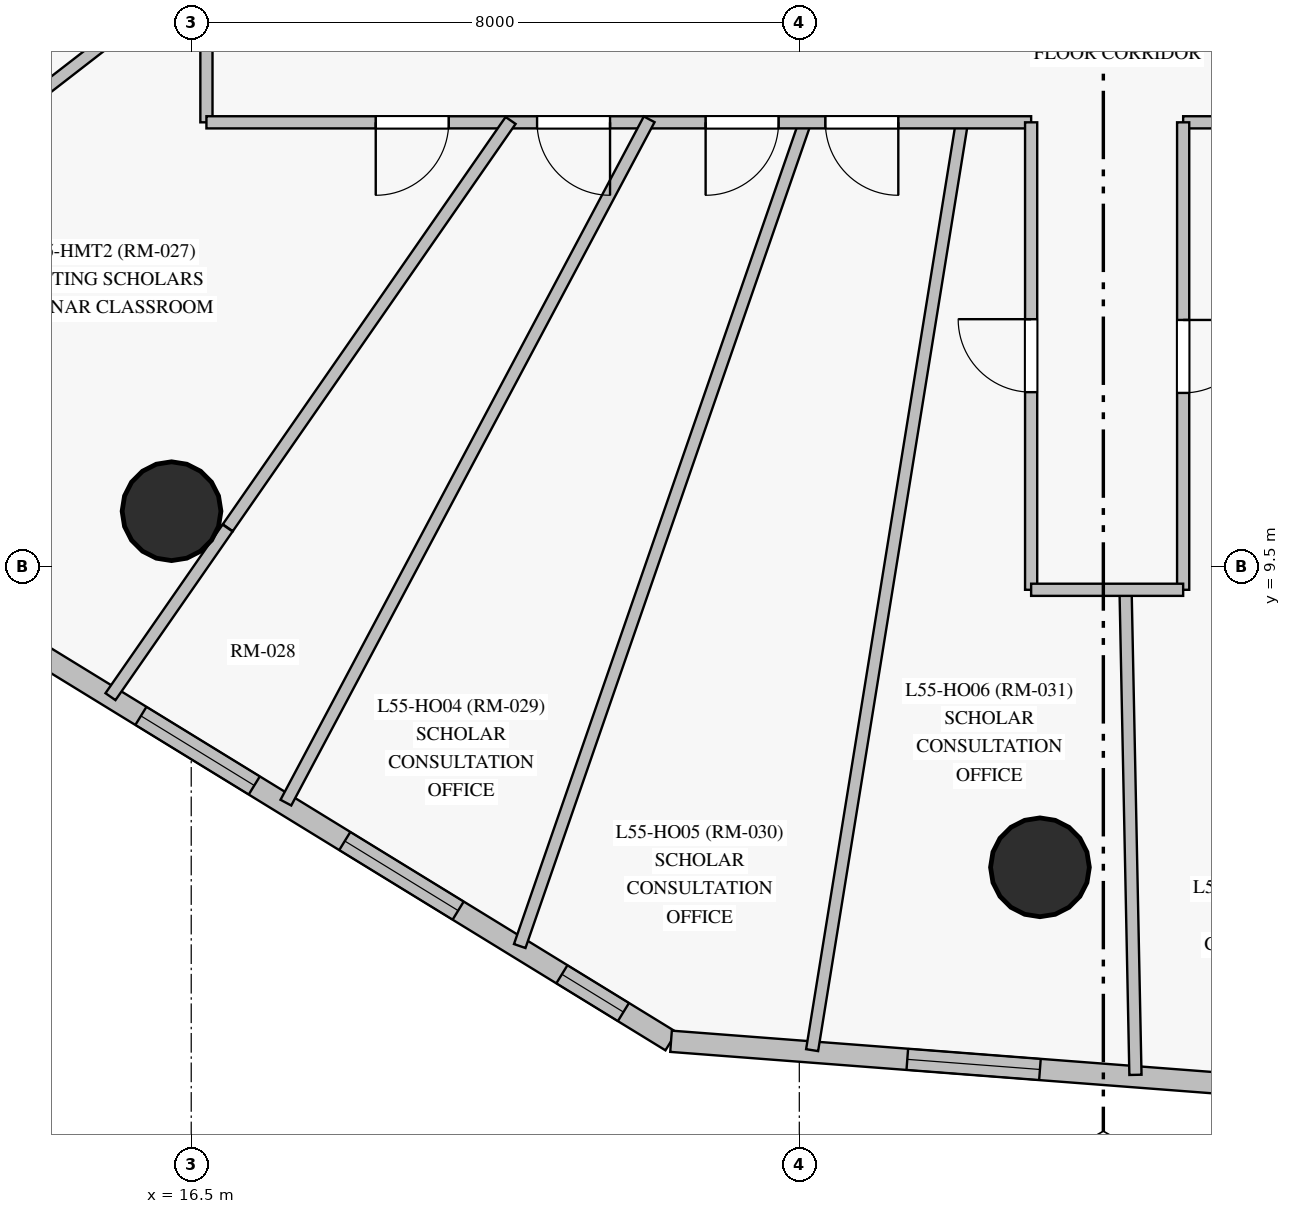
"""IFC4 building model, lengths in metres.
Left out: names, types, materials, properties, quantities, classifications, styles, units other than length and angle.
Written with IfcOpenShell. Run it as: python <this file> out.ifc"""

import sys

from ifc_helpers import new_model, si_unit, direction, frame, frame_2d, origin, origin_with_axes, origin_2d, place, context, subcontext, project, spatial, rectangle, circle, extrude, source, transform, mapped, element, fill, save


model = new_model("IFC4")
c1 = context("Model", 3, precision=1e-05, world=origin(), true_north=direction((0.0, 1.0)))
c2 = subcontext(c1, "Body", "Model", "MODEL_VIEW")
j1 = project(units=[si_unit("LENGTHUNIT", "METRE"), si_unit("PLANEANGLEUNIT", "RADIAN")], contexts=[c1])
p1 = place(None, origin())
s1 = spatial("IfcSite", under=j1, at=p1, CompositionType="ELEMENT")
p2 = place(p1, origin())
s2 = spatial("IfcBuilding", under=s1, at=p2, CompositionType="ELEMENT")
p3 = place(p2, frame((0.0, 0.0, 190.1)))
s3 = spatial("IfcBuildingStorey", under=s2, at=p3, CompositionType="ELEMENT", Elevation=190.1)
m1 = source(origin_with_axes(), c2, "Body", "SweptSolid", [
    extrude(circle(Radius=0.65, at=origin_2d()), origin(), (0.0, 0.0, 1.0), 3.05),
])
for number, where, z_axis, x_axis in (
    (1, (16.241, 10.234, 0.0), (0.0, 0.0, 1.0), (1.0, 0.0, 0.0)),
    (2, (27.666, 5.549, 0.0), (0.0, 0.0, 1.0), (1.0, 0.0, 0.0)),
):
    element("IfcColumn", number, at=place(p3, frame(where, z_axis=z_axis, x_axis=x_axis)), inside=s3, PredefinedType="COLUMN", context=c2, shape_type="MappedRepresentation", body=[
        mapped(m1, transform((0.0, 0.0, 0.0), scale=1.0)),
    ])
p4 = place(p3, frame((14.086, 8.616, 0.0), z_axis=(0.0, 0.0, 1.0), x_axis=(0.852261121645, -0.523116603189, 0.0)))
e3 = element("IfcWall", 3, at=p4, inside=s3, PredefinedType="SOLIDWALL", context=c2, shape_type="SweptSolid", body=[
    extrude(rectangle(XDim=10.239, YDim=0.28, at=frame_2d((5.12, 0.0))), origin(), (0.0, 0.0, 1.0), 2.825),
])
p5 = place(p4, frame((2.056, 0.0, 0.85)))
e4 = element("IfcOpeningElement", 4, at=p5, cuts=e3, PredefinedType="OPENING", context=c2, shape_type="SweptSolid", body=[
    extrude(rectangle(XDim=1.75, YDim=1.65, at=frame_2d((0.875, 0.825))), frame((0.0, 0.15, 0.0), z_axis=(0.0, -1.0, 0.0), x_axis=(1.0, 0.0, 0.0)), (0.0, 0.0, 1.0), 0.3),
])
p6 = place(p4, frame((5.203, 0.0, 0.85)))
e5 = element("IfcOpeningElement", 5, at=p6, cuts=e3, PredefinedType="OPENING", context=c2, shape_type="SweptSolid", body=[
    extrude(rectangle(XDim=1.75, YDim=1.65, at=frame_2d((0.875, 0.825))), frame((0.0, 0.15, 0.0), z_axis=(0.0, -1.0, 0.0), x_axis=(1.0, 0.0, 0.0)), (0.0, 0.0, 1.0), 0.3),
])
p7 = place(p4, frame((8.554, 0.0, 0.85)))
e6 = element("IfcOpeningElement", 6, at=p7, cuts=e3, PredefinedType="OPENING", context=c2, shape_type="SweptSolid", body=[
    extrude(rectangle(XDim=0.95, YDim=1.5, at=frame_2d((0.475, 0.75))), frame((0.0, 0.15, 0.0), z_axis=(0.0, -1.0, 0.0), x_axis=(1.0, 0.0, 0.0)), (0.0, 0.0, 1.0), 0.3),
])
p8 = place(p3, frame((22.812, 3.26, 0.0), z_axis=(0.0, 0.0, 1.0), x_axis=(0.997092892989, -0.076195555985, 0.0)))
e7 = element("IfcWall", 7, at=p8, inside=s3, PredefinedType="SOLIDWALL", context=c2, shape_type="SweptSolid", body=[
    extrude(rectangle(XDim=13.156, YDim=0.28, at=frame_2d((6.578, 0.0))), origin(), (0.0, 0.0, 1.0), 2.825),
])
p9 = place(p8, frame((3.117, 0.0, 0.85)))
e8 = element("IfcOpeningElement", 8, at=p9, cuts=e7, PredefinedType="OPENING", context=c2, shape_type="SweptSolid", body=[
    extrude(rectangle(XDim=1.75, YDim=1.65, at=frame_2d((0.875, 0.825))), frame((0.0, 0.15, 0.0), z_axis=(0.0, -1.0, 0.0), x_axis=(1.0, 0.0, 0.0)), (0.0, 0.0, 1.0), 0.3),
])
p10 = place(p8, frame((7.303, 0.0, 0.85)))
e9 = element("IfcOpeningElement", 9, at=p10, cuts=e7, PredefinedType="OPENING", context=c2, shape_type="SweptSolid", body=[
    extrude(rectangle(XDim=1.75, YDim=1.65, at=frame_2d((0.875, 0.825))), frame((0.0, 0.15, 0.0), z_axis=(0.0, -1.0, 0.0), x_axis=(1.0, 0.0, 0.0)), (0.0, 0.0, 1.0), 0.3),
])
p11 = place(p8, frame((10.79, 0.0, 0.85)))
e10 = element("IfcOpeningElement", 10, at=p11, cuts=e7, PredefinedType="OPENING", context=c2, shape_type="SweptSolid", body=[
    extrude(rectangle(XDim=1.75, YDim=1.65, at=frame_2d((0.875, 0.825))), frame((0.0, 0.15, 0.0), z_axis=(0.0, -1.0, 0.0), x_axis=(1.0, 0.0, 0.0)), (0.0, 0.0, 1.0), 0.3),
])
p12 = place(p3, frame((16.7, 15.35, 0.0), z_axis=(0.0, 0.0, 1.0), x_axis=(0.0, 1.0, 0.0)))
e11 = element("IfcWall", 11, at=p12, inside=s3, PredefinedType="PARTITIONING", context=c2, shape_type="SweptSolid", body=[
    extrude(rectangle(XDim=22.3, YDim=0.16, at=frame_2d((11.15, 0.0))), origin(), (0.0, 0.0, 1.0), 2.275),
])
p13 = place(p12, frame((16.25, 0.0, 0.0)))
e12 = element("IfcOpeningElement", 12, at=p13, cuts=e11, PredefinedType="OPENING", context=c2, shape_type="SweptSolid", body=[
    extrude(rectangle(XDim=0.96, YDim=2.15, at=frame_2d((0.48, 1.075))), frame((0.0, 0.09, 0.0), z_axis=(0.0, -1.0, 0.0), x_axis=(1.0, 0.0, 0.0)), (0.0, 0.0, 1.0), 0.18),
])
p14 = place(p12, frame((11.065, 0.0, 0.0)))
e13 = element("IfcOpeningElement", 13, at=p14, cuts=e11, PredefinedType="OPENING", context=c2, shape_type="SweptSolid", body=[
    extrude(rectangle(XDim=0.96, YDim=2.15, at=frame_2d((0.48, 1.075))), frame((0.0, 0.09, 0.0), z_axis=(0.0, -1.0, 0.0), x_axis=(1.0, 0.0, 0.0)), (0.0, 0.0, 1.0), 0.18),
])
p15 = place(p12, frame((7.33, 0.0, 0.0)))
e14 = element("IfcOpeningElement", 14, at=p15, cuts=e11, PredefinedType="OPENING", context=c2, shape_type="SweptSolid", body=[
    extrude(rectangle(XDim=0.96, YDim=2.15, at=frame_2d((0.48, 1.075))), frame((0.0, 0.09, 0.0), z_axis=(0.0, -1.0, 0.0), x_axis=(1.0, 0.0, 0.0)), (0.0, 0.0, 1.0), 0.18),
])
p16 = place(p12, frame((5.1, 0.0, 0.0)))
e15 = element("IfcOpeningElement", 15, at=p16, cuts=e11, PredefinedType="OPENING", context=c2, shape_type="SweptSolid", body=[
    extrude(rectangle(XDim=0.96, YDim=2.15, at=frame_2d((0.48, 1.075))), frame((0.0, 0.09, 0.0), z_axis=(0.0, -1.0, 0.0), x_axis=(1.0, 0.0, 0.0)), (0.0, 0.0, 1.0), 0.18),
])
p17 = place(p12, frame((18.392, 0.0, 0.0)))
e16 = element("IfcOpeningElement", 16, at=p17, cuts=e11, PredefinedType="OPENING", context=c2, shape_type="SweptSolid", body=[
    extrude(rectangle(XDim=0.96, YDim=2.15, at=frame_2d((0.48, 1.075))), frame((0.0, 0.09, 0.0), z_axis=(0.0, -1.0, 0.0), x_axis=(1.0, 0.0, 0.0)), (0.0, 0.0, 1.0), 0.18),
])
p18 = place(p3, frame((26.644, 15.38, 0.0), z_axis=(0.0, 0.0, 1.0), x_axis=(-0.159375496457, -0.987218036266, 0.0)))
e17 = element("IfcWall", 17, at=p18, inside=s3, PredefinedType="PARTITIONING", context=c2, shape_type="SweptSolid", body=[
    extrude(rectangle(XDim=12.394, YDim=0.16, at=frame_2d((6.197, 0.0))), origin(), (0.0, 0.0, 1.0), 2.275),
])
p19 = place(p3, frame((24.585, 15.378, 0.0), z_axis=(0.0, 0.0, 1.0), x_axis=(-0.327238910926, -0.944941635857, 0.0)))
e18 = element("IfcWall", 18, at=p19, inside=s3, PredefinedType="PARTITIONING", context=c2, shape_type="SweptSolid", body=[
    extrude(rectangle(XDim=11.498, YDim=0.16, at=frame_2d((5.749, 0.0))), origin(), (0.0, 0.0, 1.0), 2.825),
])
p20 = place(p3, frame((27.55, 15.35, 0.0), z_axis=(0.0, 0.0, 1.0), x_axis=(-1.0, 0.0, 0.0)))
e19 = element("IfcWall", 19, at=p20, inside=s3, PredefinedType="PARTITIONING", context=c2, shape_type="SweptSolid", body=[
    extrude(rectangle(XDim=10.85, YDim=0.16, at=frame_2d((5.425, 0.0))), origin(), (0.0, 0.0, 1.0), 2.375),
])
p21 = place(p20, frame((7.663, 0.0, 0.0)))
e20 = element("IfcOpeningElement", 20, at=p21, cuts=e19, PredefinedType="OPENING", context=c2, shape_type="SweptSolid", body=[
    extrude(rectangle(XDim=0.96, YDim=2.15, at=frame_2d((0.48, 1.075))), frame((0.0, 0.09, 0.0), z_axis=(0.0, -1.0, 0.0), x_axis=(1.0, 0.0, 0.0)), (0.0, 0.0, 1.0), 0.18),
])
p22 = place(p20, frame((5.54, 0.0, 0.0)))
e21 = element("IfcOpeningElement", 21, at=p22, cuts=e19, PredefinedType="OPENING", context=c2, shape_type="SweptSolid", body=[
    extrude(rectangle(XDim=0.96, YDim=2.15, at=frame_2d((0.48, 1.075))), frame((0.0, 0.09, 0.0), z_axis=(0.0, -1.0, 0.0), x_axis=(1.0, 0.0, 0.0)), (0.0, 0.0, 1.0), 0.18),
])
p23 = place(p20, frame((3.323, 0.0, 0.0)))
e22 = element("IfcOpeningElement", 22, at=p23, cuts=e19, PredefinedType="OPENING", context=c2, shape_type="SweptSolid", body=[
    extrude(rectangle(XDim=0.96, YDim=2.15, at=frame_2d((0.48, 1.075))), frame((0.0, 0.09, 0.0), z_axis=(0.0, -1.0, 0.0), x_axis=(1.0, 0.0, 0.0)), (0.0, 0.0, 1.0), 0.18),
])
p24 = place(p20, frame((1.748, 0.0, 0.0)))
e23 = element("IfcOpeningElement", 23, at=p24, cuts=e19, PredefinedType="OPENING", context=c2, shape_type="SweptSolid", body=[
    extrude(rectangle(XDim=0.96, YDim=2.15, at=frame_2d((0.48, 1.075))), frame((0.0, 0.09, 0.0), z_axis=(0.0, -1.0, 0.0), x_axis=(1.0, 0.0, 0.0)), (0.0, 0.0, 1.0), 0.18),
])
p25 = place(p3, frame((40.2, 15.35, 0.0), z_axis=(0.0, 0.0, 1.0), x_axis=(-1.0, 0.0, 0.0)))
e24 = element("IfcWall", 24, at=p25, inside=s3, PredefinedType="PARTITIONING", context=c2, shape_type="SweptSolid", body=[
    extrude(rectangle(XDim=10.65, YDim=0.16, at=frame_2d((5.325, 0.0))), origin(), (0.0, 0.0, 1.0), 2.275),
])
p26 = place(p25, frame((8.002, 0.0, 0.0)))
e25 = element("IfcOpeningElement", 25, at=p26, cuts=e24, PredefinedType="OPENING", context=c2, shape_type="SweptSolid", body=[
    extrude(rectangle(XDim=0.96, YDim=2.15, at=frame_2d((0.48, 1.075))), frame((0.0, 0.09, 0.0), z_axis=(0.0, -1.0, 0.0), x_axis=(1.0, 0.0, 0.0)), (0.0, 0.0, 1.0), 0.18),
])
p27 = place(p25, frame((5.258, 0.0, 0.0)))
e26 = element("IfcOpeningElement", 26, at=p27, cuts=e24, PredefinedType="OPENING", context=c2, shape_type="SweptSolid", body=[
    extrude(rectangle(XDim=0.96, YDim=2.15, at=frame_2d((0.48, 1.075))), frame((0.0, 0.09, 0.0), z_axis=(0.0, -1.0, 0.0), x_axis=(1.0, 0.0, 0.0)), (0.0, 0.0, 1.0), 0.18),
])
p28 = place(p25, frame((2.31, 0.0, 0.0)))
e27 = element("IfcOpeningElement", 27, at=p28, cuts=e24, PredefinedType="OPENING", context=c2, shape_type="SweptSolid", body=[
    extrude(rectangle(XDim=0.96, YDim=2.15, at=frame_2d((0.48, 1.075))), frame((0.0, 0.09, 0.0), z_axis=(0.0, -1.0, 0.0), x_axis=(1.0, 0.0, 0.0)), (0.0, 0.0, 1.0), 0.18),
])
p29 = place(p25, frame((4.177, 0.0, 0.0)))
e28 = element("IfcOpeningElement", 28, at=p29, cuts=e24, PredefinedType="OPENING", context=c2, shape_type="SweptSolid", body=[
    extrude(rectangle(XDim=0.86, YDim=2.1, at=frame_2d((0.43, 1.05))), frame((0.0, 0.09, 0.0), z_axis=(0.0, -1.0, 0.0), x_axis=(1.0, 0.0, 0.0)), (0.0, 0.0, 1.0), 0.18),
])
p30 = place(p3, frame((22.525, 15.39, 0.0), z_axis=(0.0, 0.0, 1.0), x_axis=(-0.469441564183, -0.882963542746, 0.0)))
e29 = element("IfcWall", 29, at=p30, inside=s3, PredefinedType="PARTITIONING", context=c2, shape_type="SweptSolid", body=[
    extrude(rectangle(XDim=10.181, YDim=0.16, at=frame_2d((5.091, 0.0))), origin(), (0.0, 0.0, 1.0), 2.825),
])
p31 = place(p3, frame((20.702, 15.375, 0.0), z_axis=(0.0, 0.0, 1.0), x_axis=(-0.570371261256, -0.821387012518, 0.0)))
e30 = element("IfcWall", 30, at=p31, inside=s3, PredefinedType="PARTITIONING", context=c2, shape_type="SweptSolid", body=[
    extrude(rectangle(XDim=6.523, YDim=0.16, at=frame_2d((3.262, 0.0))), origin(), (0.0, 0.0, 1.0), 2.825),
])
p32 = place(p3, frame((28.792, 9.23, 0.0), z_axis=(0.0, 0.0, 1.0), x_axis=(0.020368189048, -0.999792546919, 0.0)))
e31 = element("IfcWall", 31, at=p32, inside=s3, PredefinedType="PARTITIONING", context=c2, shape_type="SweptSolid", body=[
    extrude(rectangle(XDim=6.413, YDim=0.16, at=frame_2d((3.206, 0.0))), origin(), (0.0, 0.0, 1.0), 2.825),
])
p33 = place(p3, frame((29.55, 15.35, 0.0), z_axis=(0.0, 0.0, 1.0), x_axis=(0.0, -1.0, 0.0)))
e32 = element("IfcWall", 32, at=p33, inside=s3, PredefinedType="PARTITIONING", context=c2, shape_type="SweptSolid", body=[
    extrude(rectangle(XDim=6.15, YDim=0.16, at=frame_2d((3.075, 0.0))), origin(), (0.0, 0.0, 1.0), 2.825),
])
p34 = place(p33, frame((2.6, 0.0, 0.0)))
e33 = element("IfcOpeningElement", 33, at=p34, cuts=e32, PredefinedType="OPENING", context=c2, shape_type="SweptSolid", body=[
    extrude(rectangle(XDim=0.96, YDim=2.15, at=frame_2d((0.48, 1.075))), frame((0.0, 0.09, 0.0), z_axis=(0.0, -1.0, 0.0), x_axis=(1.0, 0.0, 0.0)), (0.0, 0.0, 1.0), 0.18),
])
p35 = place(p3, frame((27.55, 9.2, 0.0), z_axis=(0.0, 0.0, 1.0), x_axis=(0.0, 1.0, 0.0)))
e34 = element("IfcWall", 34, at=p35, inside=s3, PredefinedType="PARTITIONING", context=c2, shape_type="SweptSolid", body=[
    extrude(rectangle(XDim=6.15, YDim=0.16, at=frame_2d((3.075, 0.0))), origin(), (0.0, 0.0, 1.0), 2.275),
])
p36 = place(p35, frame((2.6, 0.0, 0.0)))
e35 = element("IfcOpeningElement", 35, at=p36, cuts=e34, PredefinedType="OPENING", context=c2, shape_type="SweptSolid", body=[
    extrude(rectangle(XDim=0.96, YDim=2.15, at=frame_2d((0.48, 1.075))), frame((0.0, 0.09, 0.0), z_axis=(0.0, -1.0, 0.0), x_axis=(1.0, 0.0, 0.0)), (0.0, 0.0, 1.0), 0.18),
])
p37 = place(p3, frame((16.736, 17.461, 0.0), z_axis=(0.0, 0.0, 1.0), x_axis=(-0.790506924832, -0.612453101708, 0.0)))
e36 = element("IfcWall", 36, at=p37, inside=s3, PredefinedType="PARTITIONING", context=c2, shape_type="SweptSolid", body=[
    extrude(rectangle(XDim=4.503, YDim=0.16, at=frame_2d((2.251, 0.0))), origin(), (0.0, 0.0, 1.0), 2.275),
])
p38 = place(p3, frame((16.978, 10.012, 0.0), z_axis=(0.0, 0.0, 1.0), x_axis=(-0.570412750216, -0.821358201025, 0.0)))
e37 = element("IfcWall", 37, at=p38, inside=s3, PredefinedType="PARTITIONING", context=c2, shape_type="SweptSolid", body=[
    extrude(rectangle(XDim=2.701, YDim=0.16, at=frame_2d((1.35, 0.0))), origin(), (0.0, 0.0, 1.0), 2.825),
])
p39 = place(p3, frame((29.55, 9.2, 0.0), z_axis=(0.0, 0.0, 1.0), x_axis=(-1.0, 0.0, 0.0)))
e38 = element("IfcWall", 38, at=p39, inside=s3, PredefinedType="PARTITIONING", context=c2, shape_type="SweptSolid", body=[
    extrude(rectangle(XDim=2.0, YDim=0.16, at=frame_2d((1.0, 0.0))), origin(), (0.0, 0.0, 1.0), 2.495),
])
m2 = source(origin_with_axes(), c2, "Body", "SweptSolid", [
    extrude(rectangle(XDim=1.75, YDim=1.65, at=frame_2d((0.875, 0.825))), frame((0.0, 0.03, 0.0), z_axis=(0.0, -1.0, 0.0), x_axis=(1.0, 0.0, 0.0)), (0.0, 0.0, 1.0), 0.06),
])
p40 = place(p5, origin())
e39 = element("IfcWindow", 39, at=p40, inside=s3, PartitioningType="SINGLE_PANEL", PredefinedType="WINDOW", context=c2, shape_type="MappedRepresentation", body=[
    mapped(m2, transform((0.0, 0.0, 0.0), scale=1.0)),
])
fill(e4, e39)
p41 = place(p6, origin())
e40 = element("IfcWindow", 40, at=p41, inside=s3, PartitioningType="SINGLE_PANEL", PredefinedType="WINDOW", context=c2, shape_type="MappedRepresentation", body=[
    mapped(m2, transform((0.0, 0.0, 0.0), scale=1.0)),
])
fill(e5, e40)
m3 = source(origin_with_axes(), c2, "Body", "SweptSolid", [
    extrude(rectangle(XDim=0.95, YDim=1.5, at=frame_2d((0.475, 0.75))), frame((0.0, 0.03, 0.0), z_axis=(0.0, -1.0, 0.0), x_axis=(1.0, 0.0, 0.0)), (0.0, 0.0, 1.0), 0.06),
])
p42 = place(p7, origin())
e41 = element("IfcWindow", 41, at=p42, inside=s3, PartitioningType="SINGLE_PANEL", PredefinedType="WINDOW", context=c2, shape_type="MappedRepresentation", body=[
    mapped(m3, transform((0.0, 0.0, 0.0), scale=1.0)),
])
fill(e6, e41)
p43 = place(p9, origin())
e42 = element("IfcWindow", 42, at=p43, inside=s3, PartitioningType="SINGLE_PANEL", PredefinedType="WINDOW", context=c2, shape_type="MappedRepresentation", body=[
    mapped(m2, transform((0.0, 0.0, 0.0), scale=1.0)),
])
fill(e8, e42)
m4 = source(origin_with_axes(), c2, "Body", "SweptSolid", [
    extrude(rectangle(XDim=0.96, YDim=2.15, at=frame_2d((0.48, 1.075))), frame((0.0, 0.025, 0.0), z_axis=(0.0, -1.0, 0.0), x_axis=(1.0, 0.0, 0.0)), (0.0, 0.0, 1.0), 0.05),
])
p44 = place(p21, origin())
e43 = element("IfcDoor", 43, at=p44, inside=s3, OperationType="SINGLE_SWING_RIGHT", PredefinedType="DOOR", context=c2, shape_type="MappedRepresentation", body=[
    mapped(m4, transform((0.0, 0.0, 0.0), scale=1.0)),
])
fill(e20, e43)
p45 = place(p22, origin())
e44 = element("IfcDoor", 44, at=p45, inside=s3, OperationType="SINGLE_SWING_LEFT", PredefinedType="DOOR", context=c2, shape_type="MappedRepresentation", body=[
    mapped(m4, transform((0.0, 0.0, 0.0), scale=1.0)),
])
fill(e21, e44)
p46 = place(p23, origin())
e45 = element("IfcDoor", 45, at=p46, inside=s3, OperationType="SINGLE_SWING_RIGHT", PredefinedType="DOOR", context=c2, shape_type="MappedRepresentation", body=[
    mapped(m4, transform((0.0, 0.0, 0.0), scale=1.0)),
])
fill(e22, e45)
p47 = place(p24, origin())
e46 = element("IfcDoor", 46, at=p47, inside=s3, OperationType="SINGLE_SWING_LEFT", PredefinedType="DOOR", context=c2, shape_type="MappedRepresentation", body=[
    mapped(m4, transform((0.0, 0.0, 0.0), scale=1.0)),
])
fill(e23, e46)
p48 = place(p36, origin())
e47 = element("IfcDoor", 47, at=p48, inside=s3, OperationType="SINGLE_SWING_RIGHT", PredefinedType="DOOR", context=c2, shape_type="MappedRepresentation", body=[
    mapped(m4, transform((0.0, 0.0, 0.0), scale=1.0)),
])
fill(e35, e47)
p49 = place(p34, origin())
e48 = element("IfcDoor", 48, at=p49, inside=s3, OperationType="SINGLE_SWING_LEFT", PredefinedType="DOOR", context=c2, shape_type="MappedRepresentation", body=[
    mapped(m4, transform((0.0, 0.0, 0.0), scale=1.0)),
])
fill(e33, e48)
save(model, sys.argv[1])
